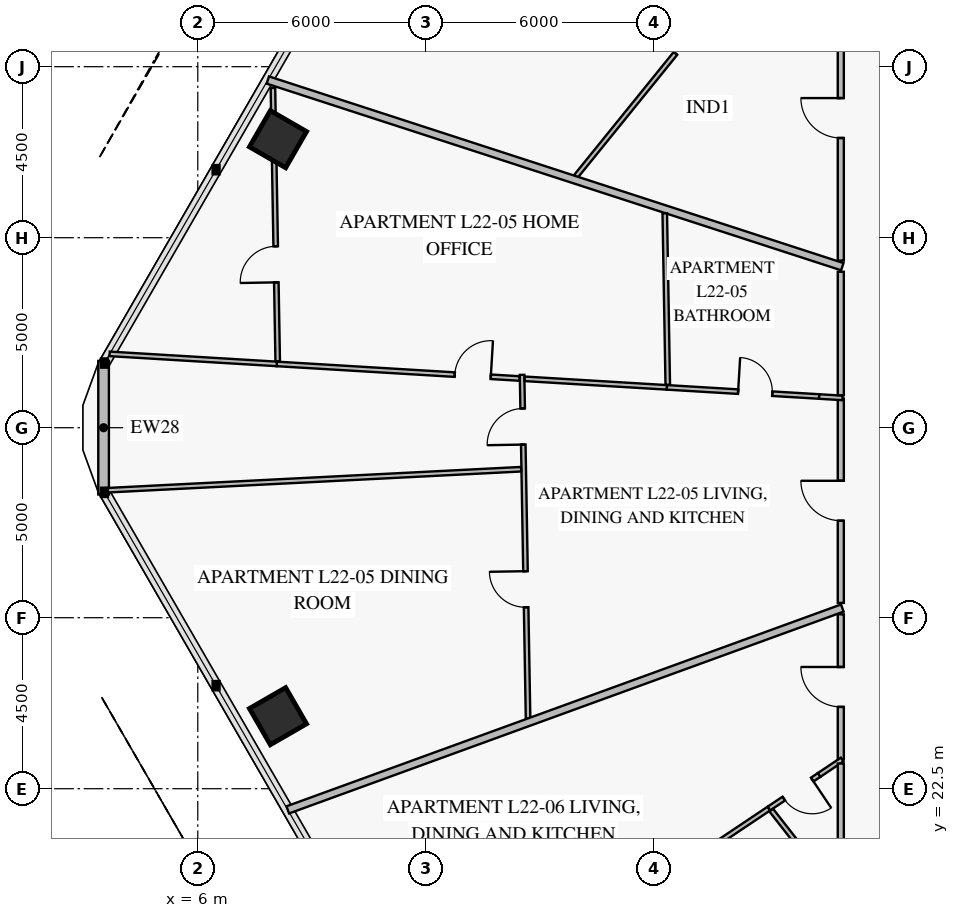
"""IFC4 building model, lengths in metres.
Left out: names, types, materials, properties, quantities, classifications, styles, units other than length and angle.
Written with IfcOpenShell. Run it as: python <this file> out.ifc"""

import sys

from ifc_helpers import new_model, si_unit, direction, frame, frame_2d, origin, origin_2d, place, context, subcontext, project, spatial, rectangle, extrude, element, fill, save


model = new_model("IFC4")
c1 = context("Model", 3, precision=1e-05, world=origin(), true_north=direction((0.0, 1.0)))
c2 = subcontext(c1, "Body", "Model", "MODEL_VIEW")
j1 = project(units=[si_unit("LENGTHUNIT", "METRE"), si_unit("PLANEANGLEUNIT", "RADIAN")], contexts=[c1])
p1 = place(None, origin())
s1 = spatial("IfcSite", under=j1, at=p1, CompositionType="ELEMENT")
p2 = place(p1, origin())
s2 = spatial("IfcBuilding", under=s1, at=p2, CompositionType="ELEMENT")
p3 = place(p2, frame((0.0, 0.0, 92.4)))
s3 = spatial("IfcBuildingStorey", under=s2, at=p3, CompositionType="ELEMENT", Elevation=92.4)
for number, where, z_axis, x_axis in (
    (1, (8.111, 39.592, 0.0), (0.0, 0.0, 1.0), (-0.5, -0.866, 0.0)),
    (2, (8.111, 24.408, 0.0), (0.0, 0.0, 1.0), (0.5, -0.866, 0.0)),
):
    element("IfcColumn", number, at=place(p3, frame(where, z_axis=z_axis, x_axis=x_axis)), inside=s3, PredefinedType="COLUMN", context=c2, shape_type="SweptSolid", body=[
        extrude(rectangle(XDim=1.1, YDim=1.1, at=origin_2d()), origin(), (0.0, 0.0, 1.0), 3.55),
    ])
p4 = place(p3, frame((3.521, 30.242, 0.0), z_axis=(0.0, 0.0, 1.0), x_axis=(0.0, 1.0, 0.0)))
e3 = element("IfcWall", 3, at=p4, inside=s3, PredefinedType="SOLIDWALL", context=c2, shape_type="SweptSolid", body=[
    extrude(rectangle(XDim=3.515, YDim=0.28, at=frame_2d((1.758, 0.0))), origin(), (0.0, 0.0, 1.0), 3.55),
])
p5 = place(p3, frame((23.244, 47.621, 0.0), z_axis=(0.0, 0.0, 1.0), x_axis=(-0.629321725732, -0.777144880651, 0.0)))
e4 = element("IfcWall", 4, at=p5, inside=s3, PredefinedType="PARTITIONING", context=c2, shape_type="SweptSolid", body=[
    extrude(rectangle(XDim=11.601, YDim=0.12, at=frame_2d((5.8, 0.0))), origin(), (0.0, 0.0, 1.0), 2.85),
])
p6 = place(p5, frame((0.916, 0.0, 0.0)))
e5 = element("IfcOpeningElement", 5, at=p6, cuts=e4, PredefinedType="OPENING", context=c2, shape_type="SweptSolid", body=[
    extrude(rectangle(XDim=0.95, YDim=2.1, at=frame_2d((0.475, 1.05))), frame((0.0, 0.072, 0.0), z_axis=(0.0, -1.0, 0.0), x_axis=(1.0, 0.0, 0.0)), (0.0, 0.0, 1.0), 0.144),
])
p7 = place(p5, frame((6.476, 0.0, 0.0)))
e6 = element("IfcOpeningElement", 6, at=p7, cuts=e4, PredefinedType="OPENING", context=c2, shape_type="SweptSolid", body=[
    extrude(rectangle(XDim=0.95, YDim=2.1, at=frame_2d((0.475, 1.05))), frame((0.0, 0.072, 0.0), z_axis=(0.0, -1.0, 0.0), x_axis=(1.0, 0.0, 0.0)), (0.0, 0.0, 1.0), 0.144),
])
p8 = place(p3, frame((22.92, 43.9, 0.0), z_axis=(0.0, 0.0, 1.0), x_axis=(0.0, -1.0, 0.0)))
e7 = element("IfcWall", 7, at=p8, inside=s3, PredefinedType="PARTITIONING", context=c2, shape_type="SweptSolid", body=[
    extrude(rectangle(XDim=7.502, YDim=0.16, at=frame_2d((3.751, 0.0))), origin(), (0.0, 0.0, 1.0), 3.55),
])
p9 = place(p8, frame((3.226, 0.0, 0.0)))
e8 = element("IfcOpeningElement", 8, at=p9, cuts=e7, PredefinedType="OPENING", context=c2, shape_type="SweptSolid", body=[
    extrude(rectangle(XDim=1.05, YDim=2.15, at=frame_2d((0.525, 1.075))), frame((0.0, 0.092, 0.0), z_axis=(0.0, -1.0, 0.0), x_axis=(1.0, 0.0, 0.0)), (0.0, 0.0, 1.0), 0.184),
])
p10 = place(p3, frame((14.533, 33.391, 0.0), z_axis=(0.0, 0.0, 1.0), x_axis=(0.017438423518, -0.999847939131, 0.0)))
e9 = element("IfcWall", 9, at=p10, inside=s3, PredefinedType="PARTITIONING", context=c2, shape_type="SweptSolid", body=[
    extrude(rectangle(XDim=9.044, YDim=0.12, at=frame_2d((4.522, 0.0))), origin(), (0.0, 0.0, 1.0), 2.85),
])
p11 = place(p10, frame((0.885, 0.0, 0.0)))
e10 = element("IfcOpeningElement", 10, at=p11, cuts=e9, PredefinedType="OPENING", context=c2, shape_type="SweptSolid", body=[
    extrude(rectangle(XDim=0.95, YDim=2.1, at=frame_2d((0.475, 1.05))), frame((0.0, 0.072, 0.0), z_axis=(0.0, -1.0, 0.0), x_axis=(1.0, 0.0, 0.0)), (0.0, 0.0, 1.0), 0.144),
])
p12 = place(p10, frame((5.167, 0.0, 0.0)))
e11 = element("IfcOpeningElement", 11, at=p12, cuts=e9, PredefinedType="OPENING", context=c2, shape_type="SweptSolid", body=[
    extrude(rectangle(XDim=0.95, YDim=2.1, at=frame_2d((0.475, 1.05))), frame((0.0, 0.072, 0.0), z_axis=(0.0, -1.0, 0.0), x_axis=(1.0, 0.0, 0.0)), (0.0, 0.0, 1.0), 0.144),
])
p13 = place(p3, frame((22.35, 32.821, 0.0), z_axis=(0.0, 0.0, 1.0), x_axis=(-0.998200406844, 0.059966221967, 0.0)))
e12 = element("IfcWall", 12, at=p13, inside=s3, PredefinedType="PARTITIONING", context=c2, shape_type="SweptSolid", body=[
    extrude(rectangle(XDim=4.014, YDim=0.12, at=frame_2d((2.007, 0.0))), origin(), (0.0, 0.0, 1.0), 3.55),
])
p14 = place(p13, frame((1.236, 0.0, 0.0)))
e13 = element("IfcOpeningElement", 13, at=p14, cuts=e12, PredefinedType="OPENING", context=c2, shape_type="SweptSolid", body=[
    extrude(rectangle(XDim=0.9, YDim=2.1, at=frame_2d((0.45, 1.05))), frame((0.0, 0.072, 0.0), z_axis=(0.0, -1.0, 0.0), x_axis=(1.0, 0.0, 0.0)), (0.0, 0.0, 1.0), 0.144),
])
p15 = place(p3, frame((18.343, 33.061, 0.0), z_axis=(0.0, 0.0, 1.0), x_axis=(-0.998197826963, 0.060009151347, 0.0)))
e14 = element("IfcWall", 14, at=p15, inside=s3, PredefinedType="PARTITIONING", context=c2, shape_type="SweptSolid", body=[
    extrude(rectangle(XDim=3.747, YDim=0.12, at=frame_2d((1.874, 0.0))), origin(), (0.0, 0.0, 1.0), 3.1),
])
p16 = place(p3, frame((14.467, 33.294, 0.0), z_axis=(0.0, 0.0, 1.0), x_axis=(-0.998197493237, 0.060014702322, 0.0)))
e15 = element("IfcWall", 15, at=p16, inside=s3, PredefinedType="PARTITIONING", context=c2, shape_type="SweptSolid", body=[
    extrude(rectangle(XDim=6.399, YDim=0.12, at=frame_2d((3.199, 0.0))), origin(), (0.0, 0.0, 1.0), 2.8),
])
p17 = place(p16, frame((0.758, 0.0, 0.0)))
e16 = element("IfcOpeningElement", 16, at=p17, cuts=e15, PredefinedType="OPENING", context=c2, shape_type="SweptSolid", body=[
    extrude(rectangle(XDim=0.95, YDim=2.1, at=frame_2d((0.475, 1.05))), frame((0.0, 0.072, 0.0), z_axis=(0.0, -1.0, 0.0), x_axis=(1.0, 0.0, 0.0)), (0.0, 0.0, 1.0), 0.144),
])
p18 = place(p3, frame((8.011, 39.021, 0.0), z_axis=(0.0, 0.0, 1.0), x_axis=(0.017441359141, -0.999847887927, 0.0)))
e17 = element("IfcWall", 17, at=p18, inside=s3, PredefinedType="PARTITIONING", context=c2, shape_type="SweptSolid", body=[
    extrude(rectangle(XDim=5.277, YDim=0.12, at=frame_2d((2.639, 0.0))), origin(), (0.0, 0.0, 1.0), 2.8),
])
p19 = place(p18, frame((2.248, 0.0, 0.0)))
e18 = element("IfcOpeningElement", 18, at=p19, cuts=e17, PredefinedType="OPENING", context=c2, shape_type="SweptSolid", body=[
    extrude(rectangle(XDim=0.95, YDim=2.1, at=frame_2d((0.475, 1.05))), frame((0.0, 0.072, 0.0), z_axis=(0.0, -1.0, 0.0), x_axis=(1.0, 0.0, 0.0)), (0.0, 0.0, 1.0), 0.144),
])
p20 = place(p3, frame((22.92, 32.766, 0.0), z_axis=(0.0, 0.0, 1.0), x_axis=(0.0, -1.0, 0.0)))
e19 = element("IfcWall", 19, at=p20, inside=s3, PredefinedType="PARTITIONING", context=c2, shape_type="SweptSolid", body=[
    extrude(rectangle(XDim=5.377, YDim=0.16, at=frame_2d((2.688, 0.0))), origin(), (0.0, 0.0, 1.0), 2.85),
])
p21 = place(p20, frame((2.163, 0.0, 0.0)))
e20 = element("IfcOpeningElement", 20, at=p21, cuts=e19, PredefinedType="OPENING", context=c2, shape_type="SweptSolid", body=[
    extrude(rectangle(XDim=1.05, YDim=2.15, at=frame_2d((0.525, 1.075))), frame((0.0, 0.092, 0.0), z_axis=(0.0, -1.0, 0.0), x_axis=(1.0, 0.0, 0.0)), (0.0, 0.0, 1.0), 0.184),
])
p22 = place(p3, frame((22.35, 22.862, 0.0), z_axis=(0.0, 0.0, 1.0), x_axis=(-0.831058391016, -0.556185176647, 0.0)))
e21 = element("IfcWall", 21, at=p22, inside=s3, PredefinedType="PARTITIONING", context=c2, shape_type="SweptSolid", body=[
    extrude(rectangle(XDim=1.593, YDim=0.12, at=frame_2d((0.796, 0.0))), origin(), (0.0, 0.0, 1.0), 3.55),
])
p23 = place(p22, frame((0.219, 0.0, 0.0)))
e22 = element("IfcOpeningElement", 22, at=p23, cuts=e21, PredefinedType="OPENING", context=c2, shape_type="SweptSolid", body=[
    extrude(rectangle(XDim=0.9, YDim=2.1, at=frame_2d((0.45, 1.05))), frame((0.0, 0.072, 0.0), z_axis=(0.0, -1.0, 0.0), x_axis=(1.0, 0.0, 0.0)), (0.0, 0.0, 1.0), 0.144),
])
p24 = place(p3, frame((21.027, 21.976, 0.0), z_axis=(0.0, 0.0, 1.0), x_axis=(-0.830972753707, -0.556313115607, 0.0)))
e23 = element("IfcWall", 23, at=p24, inside=s3, PredefinedType="PARTITIONING", context=c2, shape_type="SweptSolid", body=[
    extrude(rectangle(XDim=8.867, YDim=0.12, at=frame_2d((4.433, 0.0))), origin(), (0.0, 0.0, 1.0), 3.1),
])
p25 = place(p24, frame((3.933, 0.0, 0.0)))
e24 = element("IfcOpeningElement", 24, at=p25, cuts=e23, PredefinedType="OPENING", context=c2, shape_type="SweptSolid", body=[
    extrude(rectangle(XDim=0.95, YDim=2.1, at=frame_2d((0.475, 1.05))), frame((0.0, 0.072, 0.0), z_axis=(0.0, -1.0, 0.0), x_axis=(1.0, 0.0, 0.0)), (0.0, 0.0, 1.0), 0.144),
])
p26 = place(p3, frame((22.92, 27.088, 0.0), z_axis=(0.0, 0.0, 1.0), x_axis=(0.0, -1.0, 0.0)))
e25 = element("IfcWall", 25, at=p26, inside=s3, PredefinedType="PARTITIONING", context=c2, shape_type="SweptSolid", body=[
    extrude(rectangle(XDim=3.82, YDim=0.16, at=frame_2d((1.91, 0.0))), origin(), (0.0, 0.0, 1.0), 3.55),
])
p27 = place(p26, frame((1.385, 0.0, 0.0)))
e26 = element("IfcOpeningElement", 26, at=p27, cuts=e25, PredefinedType="OPENING", context=c2, shape_type="SweptSolid", body=[
    extrude(rectangle(XDim=1.05, YDim=2.15, at=frame_2d((0.525, 1.075))), frame((0.0, 0.092, 0.0), z_axis=(0.0, -1.0, 0.0), x_axis=(1.0, 0.0, 0.0)), (0.0, 0.0, 1.0), 0.184),
])
p28 = place(p3, frame((22.96, 36.237, 0.0), z_axis=(0.0, 0.0, 1.0), x_axis=(-0.95105675479, 0.309016260362, 0.0)))
e27 = element("IfcWall", 27, at=p28, inside=s3, PredefinedType="PARTITIONING", context=c2, shape_type="SweptSolid", body=[
    extrude(rectangle(XDim=15.894, YDim=0.2, at=frame_2d((7.947, 0.0))), origin(), (0.0, 0.0, 1.0), 2.8),
])
p29 = place(p3, frame((14.509, 30.907, 0.0), z_axis=(0.0, 0.0, 1.0), x_axis=(-0.998710415544, -0.05076914303, 0.0)))
e28 = element("IfcWall", 28, at=p29, inside=s3, PredefinedType="PARTITIONING", context=c2, shape_type="SweptSolid", body=[
    extrude(rectangle(XDim=11.041, YDim=0.12, at=frame_2d((5.521, 0.0))), origin(), (0.0, 0.0, 1.0), 2.8),
])
p30 = place(p3, frame((22.965, 32.784, 0.0), z_axis=(0.0, 0.0, 1.0), x_axis=(-0.998206740996, 0.059860690187, 0.0)))
e29 = element("IfcWall", 29, at=p30, inside=s3, PredefinedType="PARTITIONING", context=c2, shape_type="SweptSolid", body=[
    extrude(rectangle(XDim=0.616, YDim=0.12, at=frame_2d((0.308, 0.0))), origin(), (0.0, 0.0, 1.0), 3.55),
])
p31 = place(p3, frame((8.079, 33.678, 0.0), z_axis=(0.0, 0.0, 1.0), x_axis=(-0.998198281199, 0.060001595079, 0.0)))
e30 = element("IfcWall", 30, at=p31, inside=s3, PredefinedType="PARTITIONING", context=c2, shape_type="SweptSolid", body=[
    extrude(rectangle(XDim=4.407, YDim=0.12, at=frame_2d((2.203, 0.0))), origin(), (0.0, 0.0, 1.0), 2.8),
])
p32 = place(p3, frame((18.288, 37.641, 0.0), z_axis=(0.0, 0.0, 1.0), x_axis=(0.017415945178, -0.999848330925, 0.0)))
e31 = element("IfcWall", 31, at=p32, inside=s3, PredefinedType="PARTITIONING", context=c2, shape_type="SweptSolid", body=[
    extrude(rectangle(XDim=4.514, YDim=0.12, at=frame_2d((2.257, 0.0))), origin(), (0.0, 0.0, 1.0), 2.85),
])
p33 = place(p3, frame((7.978, 40.94, 0.0), z_axis=(0.0, 0.0, 1.0), x_axis=(0.017557656864, -0.999845852462, 0.0)))
e32 = element("IfcWall", 32, at=p33, inside=s3, PredefinedType="PARTITIONING", context=c2, shape_type="SweptSolid", body=[
    extrude(rectangle(XDim=0.779, YDim=0.12, at=frame_2d((0.389, 0.0))), origin(), (0.0, 0.0, 1.0), 3.55),
])
p34 = place(p3, frame((22.96, 27.254, 0.0), z_axis=(0.0, 0.0, 1.0), x_axis=(-0.939691473543, -0.342023295333, 0.0)))
e33 = element("IfcWall", 33, at=p34, inside=s3, PredefinedType="PARTITIONING", context=c2, shape_type="SweptSolid", body=[
    extrude(rectangle(XDim=15.528, YDim=0.2, at=frame_2d((7.764, 0.0))), origin(), (0.0, 0.0, 1.0), 2.8),
])
p35 = place(p3, frame((22.956, 23.268, 0.0), z_axis=(0.0, 0.0, 1.0), x_axis=(-0.830915468449, -0.556398673877, 0.0)))
e34 = element("IfcWall", 34, at=p35, inside=s3, PredefinedType="PARTITIONING", context=c2, shape_type="SweptSolid", body=[
    extrude(rectangle(XDim=0.729, YDim=0.12, at=frame_2d((0.365, 0.0))), origin(), (0.0, 0.0, 1.0), 3.55),
])
p36 = place(p3, frame((21.089, 21.936, 0.0), z_axis=(0.0, 0.0, 1.0), x_axis=(0.615669714857, -0.78800431611, 0.0)))
e35 = element("IfcWall", 35, at=p36, inside=s3, PredefinedType="PARTITIONING", context=c2, shape_type="SweptSolid", body=[
    extrude(rectangle(XDim=7.012, YDim=0.12, at=frame_2d((3.506, 0.0))), origin(), (0.0, 0.0, 1.0), 2.85),
])
p37 = place(p3, frame((22.92, 36.103, 0.0), z_axis=(0.0, 0.0, 1.0), x_axis=(0.0, -1.0, 0.0)))
e36 = element("IfcWall", 36, at=p37, inside=s3, PredefinedType="PARTITIONING", context=c2, shape_type="SweptSolid", body=[
    extrude(rectangle(XDim=3.249, YDim=0.16, at=frame_2d((1.624, 0.0))), origin(), (0.0, 0.0, 1.0), 2.85),
])
p38 = place(p3, frame((22.92, 23.162, 0.0), z_axis=(0.0, 0.0, 1.0), x_axis=(0.0, -1.0, 0.0)))
e37 = element("IfcWall", 37, at=p38, inside=s3, PredefinedType="PARTITIONING", context=c2, shape_type="SweptSolid", body=[
    extrude(rectangle(XDim=3.062, YDim=0.16, at=frame_2d((1.531, 0.0))), origin(), (0.0, 0.0, 1.0), 3.55),
])
p39 = place(p7, frame((0.95, 0.0, 0.0), z_axis=(0.0, 0.0, 1.0), x_axis=(-1.0, 0.0, 0.0)))
e38 = element("IfcDoor", 38, at=p39, inside=s3, OperationType="SINGLE_SWING_RIGHT", PredefinedType="DOOR", context=c2, shape_type="SweptSolid", body=[
    extrude(rectangle(XDim=0.95, YDim=2.1, at=frame_2d((0.475, 1.05))), frame((0.0, 0.025, 0.0), z_axis=(0.0, -1.0, 0.0), x_axis=(1.0, 0.0, 0.0)), (0.0, 0.0, 1.0), 0.05),
])
fill(e6, e38)
p40 = place(p9, frame((1.05, 0.0, 0.0), z_axis=(0.0, 0.0, 1.0), x_axis=(-1.0, 0.0, 0.0)))
e39 = element("IfcDoor", 39, at=p40, inside=s3, OperationType="SINGLE_SWING_RIGHT", PredefinedType="DOOR", context=c2, shape_type="SweptSolid", body=[
    extrude(rectangle(XDim=1.05, YDim=2.15, at=frame_2d((0.525, 1.075))), frame((0.0, 0.025, 0.0), z_axis=(0.0, -1.0, 0.0), x_axis=(1.0, 0.0, 0.0)), (0.0, 0.0, 1.0), 0.05),
])
fill(e8, e39)
p41 = place(p11, frame((0.95, 0.0, 0.0), z_axis=(0.0, 0.0, 1.0), x_axis=(-1.0, 0.0, 0.0)))
e40 = element("IfcDoor", 40, at=p41, inside=s3, OperationType="SINGLE_SWING_LEFT", PredefinedType="DOOR", context=c2, shape_type="SweptSolid", body=[
    extrude(rectangle(XDim=0.95, YDim=2.1, at=frame_2d((0.475, 1.05))), frame((0.0, 0.025, 0.0), z_axis=(0.0, -1.0, 0.0), x_axis=(1.0, 0.0, 0.0)), (0.0, 0.0, 1.0), 0.05),
])
fill(e10, e40)
p42 = place(p12, frame((0.95, 0.0, 0.0), z_axis=(0.0, 0.0, 1.0), x_axis=(-1.0, 0.0, 0.0)))
e41 = element("IfcDoor", 41, at=p42, inside=s3, OperationType="SINGLE_SWING_RIGHT", PredefinedType="DOOR", context=c2, shape_type="SweptSolid", body=[
    extrude(rectangle(XDim=0.95, YDim=2.1, at=frame_2d((0.475, 1.05))), frame((0.0, 0.025, 0.0), z_axis=(0.0, -1.0, 0.0), x_axis=(1.0, 0.0, 0.0)), (0.0, 0.0, 1.0), 0.05),
])
fill(e11, e41)
p43 = place(p14, frame((0.9, 0.0, 0.0), z_axis=(0.0, 0.0, 1.0), x_axis=(-1.0, 0.0, 0.0)))
e42 = element("IfcDoor", 42, at=p43, inside=s3, OperationType="SINGLE_SWING_LEFT", PredefinedType="DOOR", context=c2, shape_type="SweptSolid", body=[
    extrude(rectangle(XDim=0.9, YDim=2.1, at=frame_2d((0.45, 1.05))), frame((0.0, 0.025, 0.0), z_axis=(0.0, -1.0, 0.0), x_axis=(1.0, 0.0, 0.0)), (0.0, 0.0, 1.0), 0.05),
])
fill(e13, e42)
p44 = place(p17, frame((0.95, 0.0, 0.0), z_axis=(0.0, 0.0, 1.0), x_axis=(-1.0, 0.0, 0.0)))
e43 = element("IfcDoor", 43, at=p44, inside=s3, OperationType="SINGLE_SWING_RIGHT", PredefinedType="DOOR", context=c2, shape_type="SweptSolid", body=[
    extrude(rectangle(XDim=0.95, YDim=2.1, at=frame_2d((0.475, 1.05))), frame((0.0, 0.025, 0.0), z_axis=(0.0, -1.0, 0.0), x_axis=(1.0, 0.0, 0.0)), (0.0, 0.0, 1.0), 0.05),
])
fill(e16, e43)
p45 = place(p19, frame((0.95, 0.0, 0.0), z_axis=(0.0, 0.0, 1.0), x_axis=(-1.0, 0.0, 0.0)))
e44 = element("IfcDoor", 44, at=p45, inside=s3, OperationType="SINGLE_SWING_LEFT", PredefinedType="DOOR", context=c2, shape_type="SweptSolid", body=[
    extrude(rectangle(XDim=0.95, YDim=2.1, at=frame_2d((0.475, 1.05))), frame((0.0, 0.025, 0.0), z_axis=(0.0, -1.0, 0.0), x_axis=(1.0, 0.0, 0.0)), (0.0, 0.0, 1.0), 0.05),
])
fill(e18, e44)
p46 = place(p21, frame((1.05, 0.0, 0.0), z_axis=(0.0, 0.0, 1.0), x_axis=(-1.0, 0.0, 0.0)))
e45 = element("IfcDoor", 45, at=p46, inside=s3, OperationType="SINGLE_SWING_RIGHT", PredefinedType="DOOR", context=c2, shape_type="SweptSolid", body=[
    extrude(rectangle(XDim=1.05, YDim=2.15, at=frame_2d((0.525, 1.075))), frame((0.0, 0.025, 0.0), z_axis=(0.0, -1.0, 0.0), x_axis=(1.0, 0.0, 0.0)), (0.0, 0.0, 1.0), 0.05),
])
fill(e20, e45)
p47 = place(p23, origin())
e46 = element("IfcDoor", 46, at=p47, inside=s3, OperationType="SINGLE_SWING_LEFT", PredefinedType="DOOR", context=c2, shape_type="SweptSolid", body=[
    extrude(rectangle(XDim=0.9, YDim=2.1, at=frame_2d((0.45, 1.05))), frame((0.0, 0.025, 0.0), z_axis=(0.0, -1.0, 0.0), x_axis=(1.0, 0.0, 0.0)), (0.0, 0.0, 1.0), 0.05),
])
fill(e22, e46)
p48 = place(p27, frame((1.05, 0.0, 0.0), z_axis=(0.0, 0.0, 1.0), x_axis=(-1.0, 0.0, 0.0)))
e47 = element("IfcDoor", 47, at=p48, inside=s3, OperationType="SINGLE_SWING_RIGHT", PredefinedType="DOOR", context=c2, shape_type="SweptSolid", body=[
    extrude(rectangle(XDim=1.05, YDim=2.15, at=frame_2d((0.525, 1.075))), frame((0.0, 0.025, 0.0), z_axis=(0.0, -1.0, 0.0), x_axis=(1.0, 0.0, 0.0)), (0.0, 0.0, 1.0), 0.05),
])
fill(e26, e47)
save(model, sys.argv[1])
